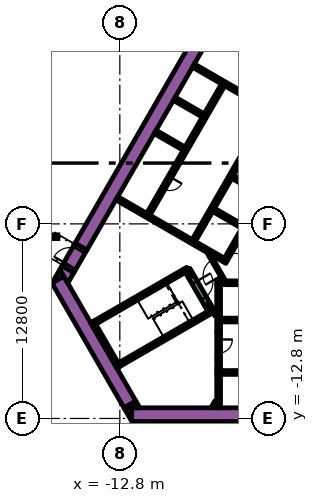
"""IFC4 building model, lengths in metres.
Left out: names, types, materials, properties, quantities, classifications, styles, units other than length and angle.
Written with IfcOpenShell. Run it as: python <this file> out.ifc"""

import sys

from ifc_helpers import new_model, si_unit, direction, frame, frame_2d, origin, origin_2d, place, context, subcontext, project, spatial, polyline, rectangle, outline, extrude, element, fill, save


model = new_model("IFC4")
c1 = context("Model", 3, precision=1e-05, world=origin(), true_north=direction((0.0, 1.0)))
c2 = subcontext(c1, "Body", "Model", "MODEL_VIEW")
j1 = project(units=[si_unit("LENGTHUNIT", "METRE"), si_unit("PLANEANGLEUNIT", "RADIAN")], contexts=[c1])
p1 = place(None, origin())
s1 = spatial("IfcSite", under=j1, at=p1, CompositionType="ELEMENT")
p2 = place(p1, origin())
s2 = spatial("IfcBuilding", under=s1, at=p2, CompositionType="ELEMENT")
p3 = place(p2, origin())
s3 = spatial("IfcBuildingStorey", under=s2, at=p3, CompositionType="ELEMENT", Elevation=0.0)
p4 = place(p3, frame((-19.355, 12.329, 2.1), z_axis=(0.200269190983, 0.336813845705, 0.920026458578), x_axis=(-0.859534207637, 0.511078218966, 0.0)))
e1 = element("IfcColumn", 1, at=p4, inside=s3, PredefinedType="COLUMN", context=c2, shape_type="SweptSolid", body=[
    extrude(rectangle(XDim=1.8, YDim=1.6, at=origin_2d()), origin(), (0.0, 0.0, 1.0), 17.608),
])
p5 = place(p2, frame((0.0, 0.0, 6.0)))
s4 = spatial("IfcBuildingStorey", under=s2, at=p5, CompositionType="ELEMENT", Elevation=6.0)
p6 = place(p5, frame((-15.36, -1.503, 0.0), z_axis=(0.0, 0.0, 1.0), x_axis=(0.50000389221, 0.866023156604, 0.0)))
e2 = element("IfcWall", 2, at=p6, inside=s4, PredefinedType="SOLIDWALL", context=c2, shape_type="SweptSolid", body=[
    extrude(rectangle(XDim=21.0, YDim=0.9, at=frame_2d((10.5, 0.0))), origin(), (0.0, 0.0, 1.0), 5.4),
])
p7 = place(p5, frame((-12.019, -12.55, 0.0), z_axis=(0.0, 0.0, 1.0), x_axis=(1.0, 0.0, 0.0)))
e3 = element("IfcWall", 3, at=p7, inside=s4, PredefinedType="SOLIDWALL", context=c2, shape_type="SweptSolid", body=[
    extrude(rectangle(XDim=21.63, YDim=0.9, at=frame_2d((10.815, 0.0))), origin(), (0.0, 0.0, 1.0), 5.4),
])
p8 = place(p5, origin())
e4 = element("IfcWall", 4, at=p8, inside=s4, PredefinedType="SOLIDWALL", context=c2, shape_type="SweptSolid", body=[
    extrude(outline(polyline([(-12.529, -12.1), (-12.021, -12.1), (-12.021, -12.98), (-12.529, -12.1)])), origin(), (0.0, 0.0, 1.0), 5.4),
])
p9 = place(p5, frame((-12.134, -11.883, 0.0), z_axis=(0.0, 0.0, 1.0), x_axis=(-0.500005339912, 0.866022320763, 0.0)))
e5 = element("IfcWall", 5, at=p9, inside=s4, PredefinedType="SOLIDWALL", context=c2, shape_type="SweptSolid", body=[
    extrude(rectangle(XDim=9.488, YDim=0.9, at=frame_2d((4.744, 0.0))), origin(), (0.0, 0.0, 1.0), 5.4),
])
e6 = element("IfcWall", 6, at=p8, inside=s4, PredefinedType="SOLIDWALL", context=c2, shape_type="SweptSolid", body=[
    extrude(outline(polyline([(-16.489, -3.44), (-17.251, -3.88), (-16.743, -3.0), (-16.489, -3.44)])), origin(), (0.0, 0.0, 1.0), 5.4),
])
e7 = element("IfcWall", 7, at=p8, inside=s4, PredefinedType="SOLIDWALL", context=c2, shape_type="SweptSolid", body=[
    extrude(outline(polyline([(-11.489, -12.1), (-12.505, -12.1), (-11.743, -11.66), (-11.489, -12.1)])), origin(), (0.0, 0.0, 1.0), 5.4),
])
e8 = element("IfcWall", 8, at=p8, inside=s4, PredefinedType="SOLIDWALL", context=c2, shape_type="SweptSolid", body=[
    extrude(outline(polyline([(-15.82, -3.201), (-16.223, -3.9), (-16.743, -3.0), (-16.599, -2.751), (-15.82, -3.201)])), origin(), (0.0, 0.0, 1.0), 5.4),
])
p10 = place(p5, frame((-12.885, -9.431, 0.0), z_axis=(0.0, 0.0, 1.0), x_axis=(-0.500020560727, 0.866013532718, 0.0)))
e9 = element("IfcWall", 9, at=p10, inside=s4, PredefinedType="SOLIDWALL", context=c2, shape_type="SweptSolid", body=[
    extrude(rectangle(XDim=3.45, YDim=0.25, at=frame_2d((1.725, 0.0))), origin(), (0.0, 0.0, 1.0), 5.4),
])
p11 = place(p5, frame((-14.44, -6.49, 0.0), z_axis=(0.0, 0.0, 1.0), x_axis=(0.866022966069, 0.500004222222, 0.0)))
e10 = element("IfcWall", 10, at=p11, inside=s4, PredefinedType="SOLIDWALL", context=c2, shape_type="SweptSolid", body=[
    extrude(rectangle(XDim=6.8, YDim=0.25, at=frame_2d((3.4, 0.0))), origin(), (0.0, 0.0, 1.0), 5.4),
])
p12 = place(p5, frame((-8.168, -3.503, 0.0), z_axis=(0.0, 0.0, 1.0), x_axis=(-0.499952099219, 0.866053057547, 0.0)))
e11 = element("IfcWall", 11, at=p12, inside=s4, PredefinedType="SOLIDWALL", context=c2, shape_type="SweptSolid", body=[
    extrude(rectangle(XDim=0.675, YDim=0.25, at=frame_2d((0.337, 0.0))), origin(), (0.0, 0.0, 1.0), 5.4),
])
p13 = place(p5, frame((-12.84, -9.261, 0.0), z_axis=(0.0, 0.0, 1.0), x_axis=(0.866016039709, 0.500016218704, 0.0)))
e12 = element("IfcWall", 12, at=p13, inside=s4, PredefinedType="SOLIDWALL", context=c2, shape_type="SweptSolid", body=[
    extrude(rectangle(XDim=7.05, YDim=0.25, at=frame_2d((3.525, 0.0))), origin(), (0.0, 0.0, 1.0), 5.4),
])
p14 = place(p5, frame((-6.905, -5.69, 0.0), z_axis=(0.0, 0.0, 1.0), x_axis=(-0.500402024738, 0.865793170242, 0.0)))
e13 = element("IfcWall", 13, at=p14, inside=s4, PredefinedType="SOLIDWALL", context=c2, shape_type="SweptSolid", body=[
    extrude(rectangle(XDim=0.425, YDim=0.25, at=frame_2d((0.212, 0.0))), origin(), (0.0, 0.0, 1.0), 5.4),
])
p15 = place(p5, frame((-6.425, -9.775, 0.0), z_axis=(0.0, 0.0, 1.0), x_axis=(1.0, 0.0, 0.0)))
e14 = element("IfcWall", 14, at=p15, inside=s4, PredefinedType="SOLIDWALL", context=c2, shape_type="SweptSolid", body=[
    extrude(rectangle(XDim=12.85, YDim=0.25, at=frame_2d((6.425, 0.0))), origin(), (0.0, 0.0, 1.0), 5.4),
])
p16 = place(p5, frame((-6.3, -9.9, 0.0), z_axis=(0.0, 0.0, 1.0), x_axis=(0.0, -1.0, 0.0)))
e15 = element("IfcWall", 15, at=p16, inside=s4, PredefinedType="SOLIDWALL", context=c2, shape_type="SweptSolid", body=[
    extrude(rectangle(XDim=2.2, YDim=0.25, at=frame_2d((1.1, 0.0))), origin(), (0.0, 0.0, 1.0), 5.4),
])
p17 = place(p5, frame((-6.3, -9.65, 0.0), z_axis=(0.0, 0.0, 1.0), x_axis=(0.0, 1.0, 0.0)))
e16 = element("IfcWall", 16, at=p17, inside=s4, PredefinedType="SOLIDWALL", context=c2, shape_type="SweptSolid", body=[
    extrude(rectangle(XDim=0.695, YDim=0.25, at=frame_2d((0.348, 0.0))), origin(), (0.0, 0.0, 1.0), 5.4),
])
p18 = place(p5, frame((-5.845, -3.875, 0.0), z_axis=(0.0, 0.0, 1.0), x_axis=(1.0, 0.0, 0.0)))
e17 = element("IfcWall", 17, at=p18, inside=s4, PredefinedType="SOLIDWALL", context=c2, shape_type="SweptSolid", body=[
    extrude(rectangle(XDim=12.27, YDim=0.25, at=frame_2d((6.135, 0.0))), origin(), (0.0, 0.0, 1.0), 5.4),
])
p19 = place(p5, frame((-6.425, -3.875, 0.0), z_axis=(0.0, 0.0, 1.0), x_axis=(1.0, 0.0, 0.0)))
e18 = element("IfcWall", 18, at=p19, inside=s4, PredefinedType="SOLIDWALL", context=c2, shape_type="SweptSolid", body=[
    extrude(rectangle(XDim=0.428, YDim=0.25, at=frame_2d((0.214, 0.0))), origin(), (0.0, 0.0, 1.0), 5.4),
])
p20 = place(p5, frame((-6.3, -4.0, 0.0), z_axis=(0.0, 0.0, 1.0), x_axis=(0.0, -1.0, 0.0)))
e19 = element("IfcWall", 19, at=p20, inside=s4, PredefinedType="SOLIDWALL", context=c2, shape_type="SweptSolid", body=[
    extrude(rectangle(XDim=3.154, YDim=0.25, at=frame_2d((1.577, 0.0))), origin(), (0.0, 0.0, 1.0), 5.4),
])
p21 = place(p5, frame((-8.06, -1.311, 0.0), z_axis=(0.0, 0.0, 1.0), x_axis=(0.50000273126, 0.866023826885, 0.0)))
e20 = element("IfcWall", 20, at=p21, inside=s4, PredefinedType="SOLIDWALL", context=c2, shape_type="SweptSolid", body=[
    extrude(rectangle(XDim=10.33, YDim=0.25, at=frame_2d((5.165, 0.0))), origin(), (0.0, 0.0, 1.0), 5.4),
])
for number, where, z_axis, x_axis in (
    (21, (-5.369, 3.1, 0.0), (0.0, 0.0, 1.0), (0.866, -0.5, 0.0)),
    (22, (-4.724, -0.182, 0.0), (0.0, 0.0, 1.0), (-0.866, 0.5, 0.0)),
):
    element("IfcWall", number, at=place(p5, frame(where, z_axis=z_axis, x_axis=x_axis)), inside=s4, PredefinedType="SOLIDWALL", context=c2, shape_type="SweptSolid", body=[
        extrude(rectangle(XDim=2.2, YDim=0.25, at=frame_2d((1.1, 0.0))), origin(), (0.0, 0.0, 1.0), 5.4),
    ])
e23 = element("IfcWall", 23, at=p8, inside=s4, PredefinedType="SOLIDWALL", context=c2, shape_type="SweptSolid", body=[
    extrude(outline(polyline([(-5.922, -2.257), (-5.922, -2.257), (-5.705, -2.382), (-5.83, -2.598), (-6.829, -2.021), (-6.88, -1.934), (-6.88, -1.934), (-6.93, -1.963), (-7.952, -1.373), (-7.827, -1.156), (-5.922, -2.257)])), origin(), (0.0, 0.0, 1.0), 5.4),
])
p22 = place(p5, frame((-8.106, -1.14, 0.0), z_axis=(0.0, 0.0, 1.0), x_axis=(-0.866000643155, 0.500042884217, 0.0)))
e24 = element("IfcWall", 24, at=p22, inside=s4, PredefinedType="SOLIDWALL", context=c2, shape_type="SweptSolid", body=[
    extrude(rectangle(XDim=5.65, YDim=0.25, at=frame_2d((2.825, 0.0))), origin(), (0.0, 0.0, 1.0), 5.4),
])
for number, where, z_axis, x_axis in (
    (25, (-8.574, 4.95, 0.0), (0.0, 0.0, 1.0), (-0.866, 0.5, 0.0)),
    (26, (-7.314, 7.132, 0.0), (0.0, 0.0, 1.0), (-0.866, 0.5, 0.0)),
):
    element("IfcWall", number, at=place(p5, frame(where, z_axis=z_axis, x_axis=x_axis)), inside=s4, PredefinedType="SOLIDWALL", context=c2, shape_type="SweptSolid", body=[
        extrude(rectangle(XDim=2.2, YDim=0.25, at=frame_2d((1.1, 0.0))), origin(), (0.0, 0.0, 1.0), 5.4),
    ])
p23 = place(p5, frame((-7.959, 10.415, 0.0), z_axis=(0.0, 0.0, 1.0), x_axis=(0.866020958405, -0.500007699544, 0.0)))
e27 = element("IfcWall", 27, at=p23, inside=s4, PredefinedType="SOLIDWALL", context=c2, shape_type="SweptSolid", body=[
    extrude(rectangle(XDim=4.1, YDim=0.25, at=frame_2d((2.05, 0.0))), origin(), (0.0, 0.0, 1.0), 5.4),
])
p24 = place(p5, frame((-6.708, -12.068, 0.0), z_axis=(0.0, 0.0, 1.0), x_axis=(0.500000789788, 0.8660249478, 0.0)))
e28 = element("IfcWall", 28, at=p24, inside=s4, PredefinedType="PARTITIONING", context=c2, shape_type="SweptSolid", body=[
    extrude(rectangle(XDim=0.456, YDim=0.15, at=frame_2d((0.228, 0.0))), origin(), (0.0, 0.0, 1.0), 4.5),
])
p25 = place(p5, frame((-6.534, -12.068, 0.0), z_axis=(0.0, 0.0, 1.0), x_axis=(0.500240224089, 0.865886665912, 0.0)))
e29 = element("IfcWall", 29, at=p25, inside=s4, PredefinedType="PARTITIONING", context=c2, shape_type="SweptSolid", body=[
    extrude(rectangle(XDim=0.109, YDim=0.15, at=frame_2d((0.054, 0.0))), origin(), (0.0, 0.0, 1.0), 4.5),
])
p26 = place(p5, frame((-6.48, -6.027, 0.0), z_axis=(0.0, 0.0, 1.0), x_axis=(-0.499927229454, 0.866067413802, 0.0)))
e30 = element("IfcWall", 30, at=p26, inside=s4, PredefinedType="PARTITIONING", context=c2, shape_type="SweptSolid", body=[
    extrude(rectangle(XDim=0.929, YDim=0.15, at=frame_2d((0.464, 0.0))), origin(), (0.0, 0.0, 1.0), 5.4),
])
p27 = place(p5, frame((-8.252, -2.958, 0.0), z_axis=(0.0, 0.0, 1.0), x_axis=(0.500174715838, -0.865924508047, 0.0)))
e31 = element("IfcWall", 31, at=p27, inside=s4, PredefinedType="PARTITIONING", context=c2, shape_type="SweptSolid", body=[
    extrude(rectangle(XDim=0.514, YDim=0.15, at=frame_2d((0.257, 0.0))), origin(), (0.0, 0.0, 1.0), 4.5),
])
p28 = place(p5, frame((-6.175, -6.325, 0.0), z_axis=(0.0, 0.0, 1.0), x_axis=(1.0, 0.0, 0.0)))
e32 = element("IfcWall", 32, at=p28, inside=s4, PredefinedType="SOLIDWALL", context=c2, shape_type="SweptSolid", body=[
    extrude(rectangle(XDim=12.35, YDim=0.25, at=frame_2d((6.175, 0.0))), origin(), (0.0, 0.0, 1.0), 5.4),
])
p29 = place(p28, frame((3.205, 0.0, 0.0)))
e33 = element("IfcOpeningElement", 33, at=p29, cuts=e32, PredefinedType="OPENING", context=c2, shape_type="SweptSolid", body=[
    extrude(rectangle(XDim=0.9, YDim=2.1, at=frame_2d((0.45, 1.05))), frame((0.0, 0.135, 0.0), z_axis=(0.0, -1.0, 0.0), x_axis=(1.0, 0.0, 0.0)), (0.0, 0.0, 1.0), 0.27),
])
p30 = place(p28, frame((8.145, 0.0, 0.0)))
e34 = element("IfcOpeningElement", 34, at=p30, cuts=e32, PredefinedType="OPENING", context=c2, shape_type="SweptSolid", body=[
    extrude(rectangle(XDim=1.1, YDim=2.1, at=frame_2d((0.55, 1.05))), frame((0.0, 0.135, 0.0), z_axis=(0.0, -1.0, 0.0), x_axis=(1.0, 0.0, 0.0)), (0.0, 0.0, 1.0), 0.27),
])
p31 = place(p28, frame((10.665, 0.0, 0.0)))
e35 = element("IfcOpeningElement", 35, at=p31, cuts=e32, PredefinedType="OPENING", context=c2, shape_type="SweptSolid", body=[
    extrude(rectangle(XDim=1.1, YDim=2.1, at=frame_2d((0.55, 1.05))), frame((0.0, 0.135, 0.0), z_axis=(0.0, -1.0, 0.0), x_axis=(1.0, 0.0, 0.0)), (0.0, 0.0, 1.0), 0.27),
])
p32 = place(p5, frame((-6.008, 9.144, 0.0), z_axis=(0.0, 0.0, 1.0), x_axis=(-0.500006956611, -0.866021387346, 0.0)))
e36 = element("IfcWall", 36, at=p32, inside=s4, PredefinedType="SOLIDWALL", context=c2, shape_type="SweptSolid", body=[
    extrude(rectangle(XDim=9.83, YDim=0.25, at=frame_2d((4.915, 0.0))), origin(), (0.0, 0.0, 1.0), 5.4),
])
p33 = place(p32, frame((6.985, 0.0, 0.0)))
e37 = element("IfcOpeningElement", 37, at=p33, cuts=e36, PredefinedType="OPENING", context=c2, shape_type="SweptSolid", body=[
    extrude(rectangle(XDim=0.9, YDim=2.1, at=frame_2d((0.45, 1.05))), frame((0.0, 0.135, 0.0), z_axis=(0.0, -1.0, 0.0), x_axis=(1.0, 0.0, 0.0)), (0.0, 0.0, 1.0), 0.27),
])
p34 = place(p5, frame((-0.898, 6.194, 0.0), z_axis=(0.0, 0.0, 1.0), x_axis=(-0.499996202215, -0.866027596426, 0.0)))
e38 = element("IfcWall", 38, at=p34, inside=s4, PredefinedType="SOLIDWALL", context=c2, shape_type="SweptSolid", body=[
    extrude(rectangle(XDim=9.83, YDim=0.25, at=frame_2d((4.915, 0.0))), origin(), (0.0, 0.0, 1.0), 5.4),
])
p35 = place(p34, frame((0.585, 0.0, 0.0)))
e39 = element("IfcOpeningElement", 39, at=p35, cuts=e38, PredefinedType="OPENING", context=c2, shape_type="SweptSolid", body=[
    extrude(rectangle(XDim=1.1, YDim=2.1, at=frame_2d((0.55, 1.05))), frame((0.0, 0.135, 0.0), z_axis=(0.0, -1.0, 0.0), x_axis=(1.0, 0.0, 0.0)), (0.0, 0.0, 1.0), 0.27),
])
p36 = place(p34, frame((3.105, 0.0, 0.0)))
e40 = element("IfcOpeningElement", 40, at=p36, cuts=e38, PredefinedType="OPENING", context=c2, shape_type="SweptSolid", body=[
    extrude(rectangle(XDim=1.1, YDim=2.1, at=frame_2d((0.55, 1.05))), frame((0.0, 0.135, 0.0), z_axis=(0.0, -1.0, 0.0), x_axis=(1.0, 0.0, 0.0)), (0.0, 0.0, 1.0), 0.27),
])
p37 = place(p34, frame((5.625, 0.0, 0.0)))
e41 = element("IfcOpeningElement", 41, at=p37, cuts=e38, PredefinedType="OPENING", context=c2, shape_type="SweptSolid", body=[
    extrude(rectangle(XDim=1.1, YDim=2.1, at=frame_2d((0.55, 1.05))), frame((0.0, 0.135, 0.0), z_axis=(0.0, -1.0, 0.0), x_axis=(1.0, 0.0, 0.0)), (0.0, 0.0, 1.0), 0.27),
])
p38 = place(p34, frame((8.145, 0.0, 0.0)))
e42 = element("IfcOpeningElement", 42, at=p38, cuts=e38, PredefinedType="OPENING", context=c2, shape_type="SweptSolid", body=[
    extrude(rectangle(XDim=1.1, YDim=2.1, at=frame_2d((0.55, 1.05))), frame((0.0, 0.135, 0.0), z_axis=(0.0, -1.0, 0.0), x_axis=(1.0, 0.0, 0.0)), (0.0, 0.0, 1.0), 0.27),
])
p39 = place(p5, frame((-8.103, -3.466, 0.0), z_axis=(0.0, 0.0, 1.0), x_axis=(0.500078061341, -0.865980330357, 0.0)))
e43 = element("IfcWall", 43, at=p39, inside=s4, PredefinedType="SOLIDWALL", context=c2, shape_type="SweptSolid", body=[
    extrude(rectangle(XDim=2.1, YDim=0.4, at=frame_2d((1.05, 0.0))), origin(), (0.0, 0.0, 1.0), 5.4),
])
p40 = place(p39, frame((0.45, 0.0, 0.0)))
e44 = element("IfcOpeningElement", 44, at=p40, cuts=e43, PredefinedType="OPENING", context=c2, shape_type="SweptSolid", body=[
    extrude(rectangle(XDim=1.2, YDim=2.1, at=frame_2d((0.6, 1.05))), frame((0.0, 0.21, 0.0), z_axis=(0.0, -1.0, 0.0), x_axis=(1.0, 0.0, 0.0)), (0.0, 0.0, 1.0), 0.42),
])
p41 = place(p5, frame((-6.3, -7.154, 0.0), z_axis=(0.0, 0.0, 1.0), x_axis=(0.0, -1.0, 0.0)))
e45 = element("IfcWall", 45, at=p41, inside=s4, PredefinedType="SOLIDWALL", context=c2, shape_type="SweptSolid", body=[
    extrude(rectangle(XDim=1.8, YDim=0.25, at=frame_2d((0.9, 0.0))), origin(), (0.0, 0.0, 1.0), 5.4),
])
p42 = place(p41, frame((0.45, 0.0, 0.0)))
e46 = element("IfcOpeningElement", 46, at=p42, cuts=e45, PredefinedType="OPENING", context=c2, shape_type="SweptSolid", body=[
    extrude(rectangle(XDim=0.9, YDim=2.1, at=frame_2d((0.45, 1.05))), frame((0.0, 0.135, 0.0), z_axis=(0.0, -1.0, 0.0), x_axis=(1.0, 0.0, 0.0)), (0.0, 0.0, 1.0), 0.27),
])
p43 = place(p5, frame((-5.895, -3.79, 0.0), z_axis=(0.0, 0.0, 1.0), x_axis=(-0.49994051562, 0.866059744384, 0.0)))
e47 = element("IfcWall", 47, at=p43, inside=s4, PredefinedType="PARTITIONING", context=c2, shape_type="SweptSolid", body=[
    extrude(rectangle(XDim=2.1, YDim=0.15, at=frame_2d((1.05, 0.0))), origin(), (0.0, 0.0, 1.0), 4.5),
])
p44 = place(p43, frame((0.45, 0.0, 0.0)))
e48 = element("IfcOpeningElement", 48, at=p44, cuts=e47, PredefinedType="OPENING", context=c2, shape_type="SweptSolid", body=[
    extrude(rectangle(XDim=1.2, YDim=2.1, at=frame_2d((0.6, 1.05))), frame((0.0, 0.085, 0.0), z_axis=(0.0, -1.0, 0.0), x_axis=(1.0, 0.0, 0.0)), (0.0, 0.0, 1.0), 0.17),
])
p45 = place(p5, frame((-16.209, -2.976, 0.0), z_axis=(0.0, 0.0, 1.0), x_axis=(0.499954529098, 0.86605165483, 0.0)))
e49 = element("IfcWall", 49, at=p45, inside=s4, PredefinedType="SOLIDWALL", context=c2, shape_type="SweptSolid", body=[
    extrude(rectangle(XDim=1.7, YDim=0.9, at=frame_2d((0.85, 0.0))), origin(), (0.0, 0.0, 1.0), 5.4),
])
p46 = place(p45, frame((0.25, 0.0, 0.0)))
e50 = element("IfcOpeningElement", 50, at=p46, cuts=e49, PredefinedType="OPENING", context=c2, shape_type="SweptSolid", body=[
    extrude(rectangle(XDim=1.2, YDim=2.1, at=frame_2d((0.6, 1.05))), frame((0.0, 0.46, 0.0), z_axis=(0.0, -1.0, 0.0), x_axis=(1.0, 0.0, 0.0)), (0.0, 0.0, 1.0), 0.92),
])
p47 = place(p5, frame((-17.0, -0.845, 0.0), z_axis=(0.0, 0.0, 1.0), x_axis=(1.0, 0.0, 0.0)))
e51 = element("IfcColumn", 51, at=p47, inside=s4, PredefinedType="COLUMN", context=c2, shape_type="SweptSolid", body=[
    extrude(rectangle(XDim=0.25, YDim=0.25, at=origin_2d()), origin(), (0.0, 0.0, 1.0), 5.2),
])
p48 = place(p33, origin())
e52 = element("IfcDoor", 52, at=p48, inside=s4, OperationType="SINGLE_SWING_LEFT", PredefinedType="DOOR", context=c2, shape_type="SweptSolid", body=[
    extrude(rectangle(XDim=0.9, YDim=2.1, at=frame_2d((0.45, 1.05))), frame((0.0, 0.025, 0.0), z_axis=(0.0, -1.0, 0.0), x_axis=(1.0, 0.0, 0.0)), (0.0, 0.0, 1.0), 0.05),
])
fill(e37, e52)
p49 = place(p38, origin())
e53 = element("IfcDoor", 53, at=p49, inside=s4, OperationType="DOUBLE_DOOR_SLIDING", PredefinedType="DOOR", context=c2, shape_type="SweptSolid", body=[
    extrude(rectangle(XDim=1.1, YDim=2.1, at=frame_2d((0.55, 1.05))), frame((0.0, 0.025, 0.0), z_axis=(0.0, -1.0, 0.0), x_axis=(1.0, 0.0, 0.0)), (0.0, 0.0, 1.0), 0.05),
])
fill(e42, e53)
p50 = place(p40, origin())
e54 = element("IfcDoor", 54, at=p50, inside=s4, OperationType="SINGLE_SWING_LEFT", PredefinedType="DOOR", context=c2, shape_type="SweptSolid", body=[
    extrude(rectangle(XDim=1.2, YDim=2.1, at=frame_2d((0.6, 1.05))), frame((0.0, 0.025, 0.0), z_axis=(0.0, -1.0, 0.0), x_axis=(1.0, 0.0, 0.0)), (0.0, 0.0, 1.0), 0.05),
])
fill(e44, e54)
p51 = place(p42, origin())
e55 = element("IfcDoor", 55, at=p51, inside=s4, OperationType="SINGLE_SWING_LEFT", PredefinedType="DOOR", context=c2, shape_type="SweptSolid", body=[
    extrude(rectangle(XDim=0.9, YDim=2.1, at=frame_2d((0.45, 1.05))), frame((0.0, 0.025, 0.0), z_axis=(0.0, -1.0, 0.0), x_axis=(1.0, 0.0, 0.0)), (0.0, 0.0, 1.0), 0.05),
])
fill(e46, e55)
p52 = place(p44, origin())
e56 = element("IfcDoor", 56, at=p52, inside=s4, OperationType="SINGLE_SWING_LEFT", PredefinedType="DOOR", context=c2, shape_type="SweptSolid", body=[
    extrude(rectangle(XDim=1.2, YDim=2.1, at=frame_2d((0.6, 1.05))), frame((0.0, 0.025, 0.0), z_axis=(0.0, -1.0, 0.0), x_axis=(1.0, 0.0, 0.0)), (0.0, 0.0, 1.0), 0.05),
])
fill(e48, e56)
p53 = place(p46, origin())
e57 = element("IfcDoor", 57, at=p53, inside=s4, OperationType="SINGLE_SWING_LEFT", PredefinedType="DOOR", context=c2, shape_type="SweptSolid", body=[
    extrude(rectangle(XDim=1.2, YDim=2.1, at=frame_2d((0.6, 1.05))), frame((0.0, 0.025, 0.0), z_axis=(0.0, -1.0, 0.0), x_axis=(1.0, 0.0, 0.0)), (0.0, 0.0, 1.0), 0.05),
])
fill(e50, e57)
save(model, sys.argv[1])
